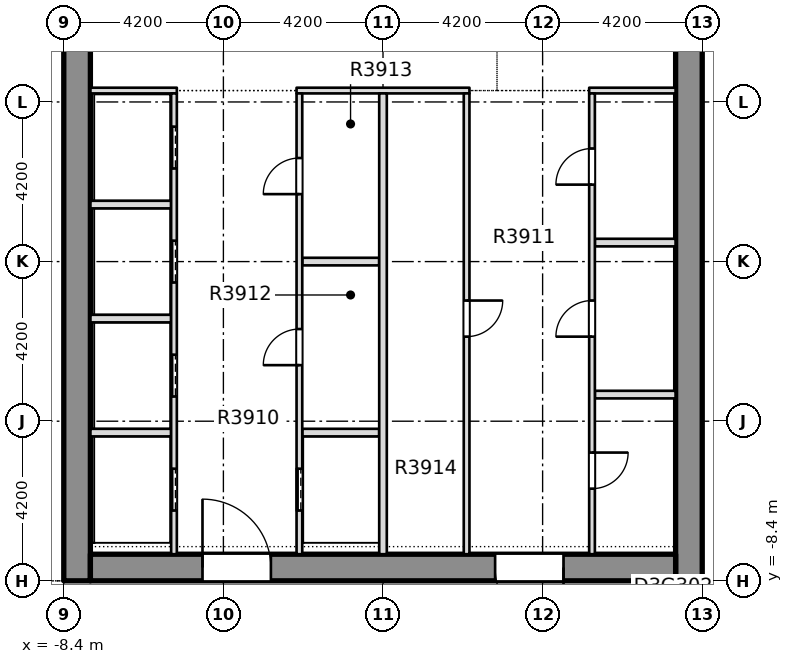
"""IFC4 building model, lengths in metres.
Left out: names, types, materials, properties, quantities, classifications, styles, units other than length and angle.
Written with IfcOpenShell. Run it as: python <this file> out.ifc"""

import sys

from ifc_helpers import new_model, si_unit, direction, frame, frame_2d, origin, place, context, subcontext, project, spatial, rectangle, extrude, element, fill, save


model = new_model("IFC4")
c1 = context("Model", 3, precision=1e-05, world=origin(), true_north=direction((0.0, 1.0)))
c2 = subcontext(c1, "Body", "Model", "MODEL_VIEW")
j1 = project(units=[si_unit("LENGTHUNIT", "METRE"), si_unit("PLANEANGLEUNIT", "RADIAN")], contexts=[c1])
p1 = place(None, origin())
s1 = spatial("IfcSite", under=j1, at=p1, CompositionType="ELEMENT")
p2 = place(p1, origin())
s2 = spatial("IfcBuilding", under=s1, at=p2, CompositionType="ELEMENT")
p3 = place(p2, frame((0.0, 0.0, 153.8)))
s3 = spatial("IfcBuildingStorey", under=s2, at=p3, CompositionType="ELEMENT", Elevation=153.8)
p4 = place(p3, frame((8.05, -8.4, -0.4), z_axis=(0.0, 0.0, 1.0), x_axis=(0.0, 1.0, 0.0)))
e1 = element("IfcWall", 1, at=p4, inside=s3, PredefinedType="SOLIDWALL", context=c2, shape_type="SweptSolid", body=[
    extrude(rectangle(XDim=30.15, YDim=0.7, at=frame_2d((15.075, 0.0))), origin(), (0.0, 0.0, 1.0), 3.45),
])
p5 = place(p4, frame((19.3, 0.0, 0.4)))
e2 = element("IfcOpeningElement", 2, at=p5, cuts=e1, PredefinedType="OPENING", context=c2, shape_type="SweptSolid", body=[
    extrude(rectangle(XDim=1.2, YDim=2.1, at=frame_2d((0.6, 1.05))), frame((0.0, 0.36, 0.0), z_axis=(0.0, -1.0, 0.0), x_axis=(1.0, 0.0, 0.0)), (0.0, 0.0, 1.0), 0.72),
])
p6 = place(p3, frame((-8.05, -8.4, -0.4), z_axis=(0.0, 0.0, 1.0), x_axis=(0.0, 1.0, 0.0)))
e3 = element("IfcWall", 3, at=p6, inside=s3, PredefinedType="SOLIDWALL", context=c2, shape_type="SweptSolid", body=[
    extrude(rectangle(XDim=30.15, YDim=0.7, at=frame_2d((15.075, 0.0))), origin(), (0.0, 0.0, 1.0), 3.45),
])
p7 = place(p6, frame((19.3, 0.0, 0.4)))
e4 = element("IfcOpeningElement", 4, at=p7, cuts=e3, PredefinedType="OPENING", context=c2, shape_type="SweptSolid", body=[
    extrude(rectangle(XDim=1.2, YDim=2.1, at=frame_2d((0.6, 1.05))), frame((0.0, 0.36, 0.0), z_axis=(0.0, -1.0, 0.0), x_axis=(1.0, 0.0, 0.0)), (0.0, 0.0, 1.0), 0.72),
])
p8 = place(p3, frame((-7.7, -8.05, -0.4), z_axis=(0.0, 0.0, 1.0), x_axis=(1.0, 0.0, 0.0)))
e5 = element("IfcWall", 5, at=p8, inside=s3, PredefinedType="SHEAR", context=c2, shape_type="SweptSolid", body=[
    extrude(rectangle(XDim=15.4, YDim=0.7, at=frame_2d((7.7, 0.0))), origin(), (0.0, 0.0, 1.0), 3.45),
])
p9 = place(p8, frame((2.95, 0.0, 0.4)))
e6 = element("IfcOpeningElement", 6, at=p9, cuts=e5, PredefinedType="OPENING", context=c2, shape_type="SweptSolid", body=[
    extrude(rectangle(XDim=1.8, YDim=2.1, at=frame_2d((0.9, 1.05))), frame((0.0, 0.36, 0.0), z_axis=(0.0, -1.0, 0.0), x_axis=(1.0, 0.0, 0.0)), (0.0, 0.0, 1.0), 0.72),
])
p10 = place(p8, frame((10.65, 0.0, 0.4)))
e7 = element("IfcOpeningElement", 7, at=p10, cuts=e5, PredefinedType="OPENING", context=c2, shape_type="SweptSolid", body=[
    extrude(rectangle(XDim=1.8, YDim=2.1, at=frame_2d((0.9, 1.05))), frame((0.0, 0.36, 0.0), z_axis=(0.0, -1.0, 0.0), x_axis=(1.0, 0.0, 0.0)), (0.0, 0.0, 1.0), 0.72),
])
p11 = place(p3, frame((-7.699, -4.5, 0.0), z_axis=(0.0, 0.0, 1.0), x_axis=(1.0, 0.0, 0.0)))
e8 = element("IfcWall", 8, at=p11, inside=s3, PredefinedType="PARTITIONING", context=c2, shape_type="SweptSolid", body=[
    extrude(rectangle(XDim=2.124, YDim=0.2, at=frame_2d((1.062, 0.0))), origin(), (0.0, 0.0, 1.0), 3.05),
])
p12 = place(p3, frame((-2.125, -4.5, 0.0), z_axis=(0.0, 0.0, 1.0), x_axis=(1.0, 0.0, 0.0)))
e9 = element("IfcWall", 9, at=p12, inside=s3, PredefinedType="PARTITIONING", context=c2, shape_type="SweptSolid", body=[
    extrude(rectangle(XDim=2.025, YDim=0.2, at=frame_2d((1.012, 0.0))), origin(), (0.0, 0.0, 1.0), 3.05),
])
for number, where, z_axis, x_axis in (
    (10, (5.575, -3.5, 0.0), (0.0, 0.0, 1.0), (1.0, 0.0, 0.0)),
    (11, (-7.699, -1.5, 0.0), (0.0, 0.0, 1.0), (1.0, 0.0, 0.0)),
):
    element("IfcWall", number, at=place(p3, frame(where, z_axis=z_axis, x_axis=x_axis)), inside=s3, PredefinedType="PARTITIONING", context=c2, shape_type="SweptSolid", body=[
        extrude(rectangle(XDim=2.124, YDim=0.2, at=frame_2d((1.062, 0.0))), origin(), (0.0, 0.0, 1.0), 3.05),
    ])
p13 = place(p3, frame((-2.125, 0.0, 0.0), z_axis=(0.0, 0.0, 1.0), x_axis=(1.0, 0.0, 0.0)))
e12 = element("IfcWall", 12, at=p13, inside=s3, PredefinedType="PARTITIONING", context=c2, shape_type="SweptSolid", body=[
    extrude(rectangle(XDim=2.025, YDim=0.2, at=frame_2d((1.012, 0.0))), origin(), (0.0, 0.0, 1.0), 3.05),
])
for number, where, z_axis, x_axis in (
    (13, (5.575, 0.5, 0.0), (0.0, 0.0, 1.0), (1.0, 0.0, 0.0)),
    (14, (-7.699, 1.5, 0.0), (0.0, 0.0, 1.0), (1.0, 0.0, 0.0)),
):
    element("IfcWall", number, at=place(p3, frame(where, z_axis=z_axis, x_axis=x_axis)), inside=s3, PredefinedType="PARTITIONING", context=c2, shape_type="SweptSolid", body=[
        extrude(rectangle(XDim=2.124, YDim=0.2, at=frame_2d((1.062, 0.0))), origin(), (0.0, 0.0, 1.0), 3.05),
    ])
p14 = place(p3, frame((-7.699, 4.5, 0.0), z_axis=(0.0, 0.0, 1.0), x_axis=(1.0, 0.0, 0.0)))
e15 = element("IfcWall", 15, at=p14, inside=s3, PredefinedType="PARTITIONING", context=c2, shape_type="SweptSolid", body=[
    extrude(rectangle(XDim=2.274, YDim=0.15, at=frame_2d((1.137, 0.0))), origin(), (0.0, 0.0, 1.0), 3.05),
])
p15 = place(p3, frame((-2.275, 4.5, 0.0), z_axis=(0.0, 0.0, 1.0), x_axis=(1.0, 0.0, 0.0)))
e16 = element("IfcWall", 16, at=p15, inside=s3, PredefinedType="PARTITIONING", context=c2, shape_type="SweptSolid", body=[
    extrude(rectangle(XDim=4.55, YDim=0.15, at=frame_2d((2.275, 0.0))), origin(), (0.0, 0.0, 1.0), 3.05),
])
p16 = place(p3, frame((5.425, 4.5, 0.0), z_axis=(0.0, 0.0, 1.0), x_axis=(1.0, 0.0, 0.0)))
e17 = element("IfcWall", 17, at=p16, inside=s3, PredefinedType="PARTITIONING", context=c2, shape_type="SweptSolid", body=[
    extrude(rectangle(XDim=2.274, YDim=0.15, at=frame_2d((1.137, 0.0))), origin(), (0.0, 0.0, 1.0), 3.05),
])
p17 = place(p3, frame((-5.5, -7.699, 0.0), z_axis=(0.0, 0.0, 1.0), x_axis=(0.0, 1.0, 0.0)))
e18 = element("IfcWall", 18, at=p17, inside=s3, PredefinedType="PARTITIONING", context=c2, shape_type="SweptSolid", body=[
    extrude(rectangle(XDim=12.124, YDim=0.15, at=frame_2d((6.062, 0.0))), origin(), (0.0, 0.0, 1.0), 3.05),
])
p18 = place(p17, frame((1.149, 0.0, 0.0)))
e19 = element("IfcOpeningElement", 19, at=p18, cuts=e18, PredefinedType="OPENING", context=c2, shape_type="SweptSolid", body=[
    extrude(rectangle(XDim=1.1, YDim=2.1, at=frame_2d((0.55, 1.05))), frame((0.0, 0.085, 0.0), z_axis=(0.0, -1.0, 0.0), x_axis=(1.0, 0.0, 0.0)), (0.0, 0.0, 1.0), 0.17),
])
p19 = place(p17, frame((4.149, 0.0, 0.0)))
e20 = element("IfcOpeningElement", 20, at=p19, cuts=e18, PredefinedType="OPENING", context=c2, shape_type="SweptSolid", body=[
    extrude(rectangle(XDim=1.1, YDim=2.1, at=frame_2d((0.55, 1.05))), frame((0.0, 0.085, 0.0), z_axis=(0.0, -1.0, 0.0), x_axis=(1.0, 0.0, 0.0)), (0.0, 0.0, 1.0), 0.17),
])
p20 = place(p17, frame((7.149, 0.0, 0.0)))
e21 = element("IfcOpeningElement", 21, at=p20, cuts=e18, PredefinedType="OPENING", context=c2, shape_type="SweptSolid", body=[
    extrude(rectangle(XDim=1.1, YDim=2.1, at=frame_2d((0.55, 1.05))), frame((0.0, 0.085, 0.0), z_axis=(0.0, -1.0, 0.0), x_axis=(1.0, 0.0, 0.0)), (0.0, 0.0, 1.0), 0.17),
])
p21 = place(p17, frame((10.149, 0.0, 0.0)))
e22 = element("IfcOpeningElement", 22, at=p21, cuts=e18, PredefinedType="OPENING", context=c2, shape_type="SweptSolid", body=[
    extrude(rectangle(XDim=1.1, YDim=2.1, at=frame_2d((0.55, 1.05))), frame((0.0, 0.085, 0.0), z_axis=(0.0, -1.0, 0.0), x_axis=(1.0, 0.0, 0.0)), (0.0, 0.0, 1.0), 0.17),
])
p22 = place(p3, frame((-2.2, -7.699, 0.0), z_axis=(0.0, 0.0, 1.0), x_axis=(0.0, 1.0, 0.0)))
e23 = element("IfcWall", 23, at=p22, inside=s3, PredefinedType="PARTITIONING", context=c2, shape_type="SweptSolid", body=[
    extrude(rectangle(XDim=12.124, YDim=0.15, at=frame_2d((6.062, 0.0))), origin(), (0.0, 0.0, 1.0), 3.05),
])
p23 = place(p22, frame((1.149, 0.0, 0.0)))
e24 = element("IfcOpeningElement", 24, at=p23, cuts=e23, PredefinedType="OPENING", context=c2, shape_type="SweptSolid", body=[
    extrude(rectangle(XDim=1.1, YDim=2.1, at=frame_2d((0.55, 1.05))), frame((0.0, 0.085, 0.0), z_axis=(0.0, -1.0, 0.0), x_axis=(1.0, 0.0, 0.0)), (0.0, 0.0, 1.0), 0.17),
])
p24 = place(p22, frame((4.974, 0.0, 0.0)))
e25 = element("IfcOpeningElement", 25, at=p24, cuts=e23, PredefinedType="OPENING", context=c2, shape_type="SweptSolid", body=[
    extrude(rectangle(XDim=0.95, YDim=2.1, at=frame_2d((0.475, 1.05))), frame((0.0, 0.085, 0.0), z_axis=(0.0, -1.0, 0.0), x_axis=(1.0, 0.0, 0.0)), (0.0, 0.0, 1.0), 0.17),
])
p25 = place(p22, frame((9.474, 0.0, 0.0)))
e26 = element("IfcOpeningElement", 26, at=p25, cuts=e23, PredefinedType="OPENING", context=c2, shape_type="SweptSolid", body=[
    extrude(rectangle(XDim=0.95, YDim=2.1, at=frame_2d((0.475, 1.05))), frame((0.0, 0.085, 0.0), z_axis=(0.0, -1.0, 0.0), x_axis=(1.0, 0.0, 0.0)), (0.0, 0.0, 1.0), 0.17),
])
p26 = place(p3, frame((0.0, -7.699, 0.0), z_axis=(0.0, 0.0, 1.0), x_axis=(0.0, 1.0, 0.0)))
e27 = element("IfcWall", 27, at=p26, inside=s3, PredefinedType="PARTITIONING", context=c2, shape_type="SweptSolid", body=[
    extrude(rectangle(XDim=12.124, YDim=0.2, at=frame_2d((6.062, 0.0))), origin(), (0.0, 0.0, 1.0), 3.05),
])
p27 = place(p3, frame((2.2, -7.699, 0.0), z_axis=(0.0, 0.0, 1.0), x_axis=(0.0, 1.0, 0.0)))
e28 = element("IfcWall", 28, at=p27, inside=s3, PredefinedType="PARTITIONING", context=c2, shape_type="SweptSolid", body=[
    extrude(rectangle(XDim=12.124, YDim=0.15, at=frame_2d((6.062, 0.0))), origin(), (0.0, 0.0, 1.0), 3.05),
])
p28 = place(p27, frame((5.724, 0.0, 0.0)))
e29 = element("IfcOpeningElement", 29, at=p28, cuts=e28, PredefinedType="OPENING", context=c2, shape_type="SweptSolid", body=[
    extrude(rectangle(XDim=0.95, YDim=2.1, at=frame_2d((0.475, 1.05))), frame((0.0, 0.085, 0.0), z_axis=(0.0, -1.0, 0.0), x_axis=(1.0, 0.0, 0.0)), (0.0, 0.0, 1.0), 0.17),
])
p29 = place(p3, frame((5.5, -7.699, 0.0), z_axis=(0.0, 0.0, 1.0), x_axis=(0.0, 1.0, 0.0)))
e30 = element("IfcWall", 30, at=p29, inside=s3, PredefinedType="PARTITIONING", context=c2, shape_type="SweptSolid", body=[
    extrude(rectangle(XDim=12.124, YDim=0.15, at=frame_2d((6.062, 0.0))), origin(), (0.0, 0.0, 1.0), 3.05),
])
p30 = place(p29, frame((1.724, 0.0, 0.0)))
e31 = element("IfcOpeningElement", 31, at=p30, cuts=e30, PredefinedType="OPENING", context=c2, shape_type="SweptSolid", body=[
    extrude(rectangle(XDim=0.95, YDim=2.1, at=frame_2d((0.475, 1.05))), frame((0.0, 0.085, 0.0), z_axis=(0.0, -1.0, 0.0), x_axis=(1.0, 0.0, 0.0)), (0.0, 0.0, 1.0), 0.17),
])
p31 = place(p29, frame((5.724, 0.0, 0.0)))
e32 = element("IfcOpeningElement", 32, at=p31, cuts=e30, PredefinedType="OPENING", context=c2, shape_type="SweptSolid", body=[
    extrude(rectangle(XDim=0.95, YDim=2.1, at=frame_2d((0.475, 1.05))), frame((0.0, 0.085, 0.0), z_axis=(0.0, -1.0, 0.0), x_axis=(1.0, 0.0, 0.0)), (0.0, 0.0, 1.0), 0.17),
])
p32 = place(p29, frame((9.724, 0.0, 0.0)))
e33 = element("IfcOpeningElement", 33, at=p32, cuts=e30, PredefinedType="OPENING", context=c2, shape_type="SweptSolid", body=[
    extrude(rectangle(XDim=0.95, YDim=2.1, at=frame_2d((0.475, 1.05))), frame((0.0, 0.085, 0.0), z_axis=(0.0, -1.0, 0.0), x_axis=(1.0, 0.0, 0.0)), (0.0, 0.0, 1.0), 0.17),
])
p33 = place(p18, origin())
e34 = element("IfcDoor", 34, at=p33, inside=s3, OperationType="SLIDING_TO_LEFT", PredefinedType="DOOR", context=c2, shape_type="SweptSolid", body=[
    extrude(rectangle(XDim=1.1, YDim=2.1, at=frame_2d((0.55, 1.05))), frame((0.0, 0.025, 0.0), z_axis=(0.0, -1.0, 0.0), x_axis=(1.0, 0.0, 0.0)), (0.0, 0.0, 1.0), 0.05),
])
fill(e19, e34)
p34 = place(p19, origin())
e35 = element("IfcDoor", 35, at=p34, inside=s3, OperationType="SLIDING_TO_LEFT", PredefinedType="DOOR", context=c2, shape_type="SweptSolid", body=[
    extrude(rectangle(XDim=1.1, YDim=2.1, at=frame_2d((0.55, 1.05))), frame((0.0, 0.025, 0.0), z_axis=(0.0, -1.0, 0.0), x_axis=(1.0, 0.0, 0.0)), (0.0, 0.0, 1.0), 0.05),
])
fill(e20, e35)
p35 = place(p20, origin())
e36 = element("IfcDoor", 36, at=p35, inside=s3, OperationType="SLIDING_TO_LEFT", PredefinedType="DOOR", context=c2, shape_type="SweptSolid", body=[
    extrude(rectangle(XDim=1.1, YDim=2.1, at=frame_2d((0.55, 1.05))), frame((0.0, 0.025, 0.0), z_axis=(0.0, -1.0, 0.0), x_axis=(1.0, 0.0, 0.0)), (0.0, 0.0, 1.0), 0.05),
])
fill(e21, e36)
p36 = place(p21, origin())
e37 = element("IfcDoor", 37, at=p36, inside=s3, OperationType="SLIDING_TO_LEFT", PredefinedType="DOOR", context=c2, shape_type="SweptSolid", body=[
    extrude(rectangle(XDim=1.1, YDim=2.1, at=frame_2d((0.55, 1.05))), frame((0.0, 0.025, 0.0), z_axis=(0.0, -1.0, 0.0), x_axis=(1.0, 0.0, 0.0)), (0.0, 0.0, 1.0), 0.05),
])
fill(e22, e37)
p37 = place(p23, origin())
e38 = element("IfcDoor", 38, at=p37, inside=s3, OperationType="SLIDING_TO_LEFT", PredefinedType="DOOR", context=c2, shape_type="SweptSolid", body=[
    extrude(rectangle(XDim=1.1, YDim=2.1, at=frame_2d((0.55, 1.05))), frame((0.0, 0.025, 0.0), z_axis=(0.0, -1.0, 0.0), x_axis=(1.0, 0.0, 0.0)), (0.0, 0.0, 1.0), 0.05),
])
fill(e24, e38)
p38 = place(p24, origin())
e39 = element("IfcDoor", 39, at=p38, inside=s3, OperationType="SINGLE_SWING_LEFT", PredefinedType="DOOR", context=c2, shape_type="SweptSolid", body=[
    extrude(rectangle(XDim=0.95, YDim=2.1, at=frame_2d((0.475, 1.05))), frame((0.0, 0.025, 0.0), z_axis=(0.0, -1.0, 0.0), x_axis=(1.0, 0.0, 0.0)), (0.0, 0.0, 1.0), 0.05),
])
fill(e25, e39)
p39 = place(p25, origin())
e40 = element("IfcDoor", 40, at=p39, inside=s3, OperationType="SINGLE_SWING_RIGHT", PredefinedType="DOOR", context=c2, shape_type="SweptSolid", body=[
    extrude(rectangle(XDim=0.95, YDim=2.1, at=frame_2d((0.475, 1.05))), frame((0.0, 0.025, 0.0), z_axis=(0.0, -1.0, 0.0), x_axis=(1.0, 0.0, 0.0)), (0.0, 0.0, 1.0), 0.05),
])
fill(e26, e40)
p40 = place(p28, origin())
e41 = element("IfcDoor", 41, at=p40, inside=s3, OperationType="SINGLE_SWING_RIGHT", PredefinedType="DOOR", context=c2, shape_type="SweptSolid", body=[
    extrude(rectangle(XDim=0.95, YDim=2.1, at=frame_2d((0.475, 1.05))), frame((0.0, 0.025, 0.0), z_axis=(0.0, -1.0, 0.0), x_axis=(1.0, 0.0, 0.0)), (0.0, 0.0, 1.0), 0.05),
])
fill(e29, e41)
p41 = place(p30, origin())
e42 = element("IfcDoor", 42, at=p41, inside=s3, OperationType="SINGLE_SWING_LEFT", PredefinedType="DOOR", context=c2, shape_type="SweptSolid", body=[
    extrude(rectangle(XDim=0.95, YDim=2.1, at=frame_2d((0.475, 1.05))), frame((0.0, 0.025, 0.0), z_axis=(0.0, -1.0, 0.0), x_axis=(1.0, 0.0, 0.0)), (0.0, 0.0, 1.0), 0.05),
])
fill(e31, e42)
p42 = place(p31, origin())
e43 = element("IfcDoor", 43, at=p42, inside=s3, OperationType="SINGLE_SWING_LEFT", PredefinedType="DOOR", context=c2, shape_type="SweptSolid", body=[
    extrude(rectangle(XDim=0.95, YDim=2.1, at=frame_2d((0.475, 1.05))), frame((0.0, 0.025, 0.0), z_axis=(0.0, -1.0, 0.0), x_axis=(1.0, 0.0, 0.0)), (0.0, 0.0, 1.0), 0.05),
])
fill(e32, e43)
p43 = place(p32, origin())
e44 = element("IfcDoor", 44, at=p43, inside=s3, OperationType="SINGLE_SWING_RIGHT", PredefinedType="DOOR", context=c2, shape_type="SweptSolid", body=[
    extrude(rectangle(XDim=0.95, YDim=2.1, at=frame_2d((0.475, 1.05))), frame((0.0, 0.025, 0.0), z_axis=(0.0, -1.0, 0.0), x_axis=(1.0, 0.0, 0.0)), (0.0, 0.0, 1.0), 0.05),
])
fill(e33, e44)
p44 = place(p9, origin())
e45 = element("IfcDoor", 45, at=p44, inside=s3, OperationType="SINGLE_SWING_LEFT", PredefinedType="DOOR", context=c2, shape_type="SweptSolid", body=[
    extrude(rectangle(XDim=1.8, YDim=2.1, at=frame_2d((0.9, 1.05))), frame((0.0, 0.025, 0.0), z_axis=(0.0, -1.0, 0.0), x_axis=(1.0, 0.0, 0.0)), (0.0, 0.0, 1.0), 0.05),
])
fill(e6, e45)
p45 = place(p10, origin())
e46 = element("IfcDoor", 46, at=p45, inside=s3, OperationType="SINGLE_SWING_LEFT", PredefinedType="DOOR", context=c2, shape_type="SweptSolid", body=[
    extrude(rectangle(XDim=1.8, YDim=2.1, at=frame_2d((0.9, 1.05))), frame((0.0, 0.025, 0.0), z_axis=(0.0, -1.0, 0.0), x_axis=(1.0, 0.0, 0.0)), (0.0, 0.0, 1.0), 0.05),
])
fill(e7, e46)
save(model, sys.argv[1])
